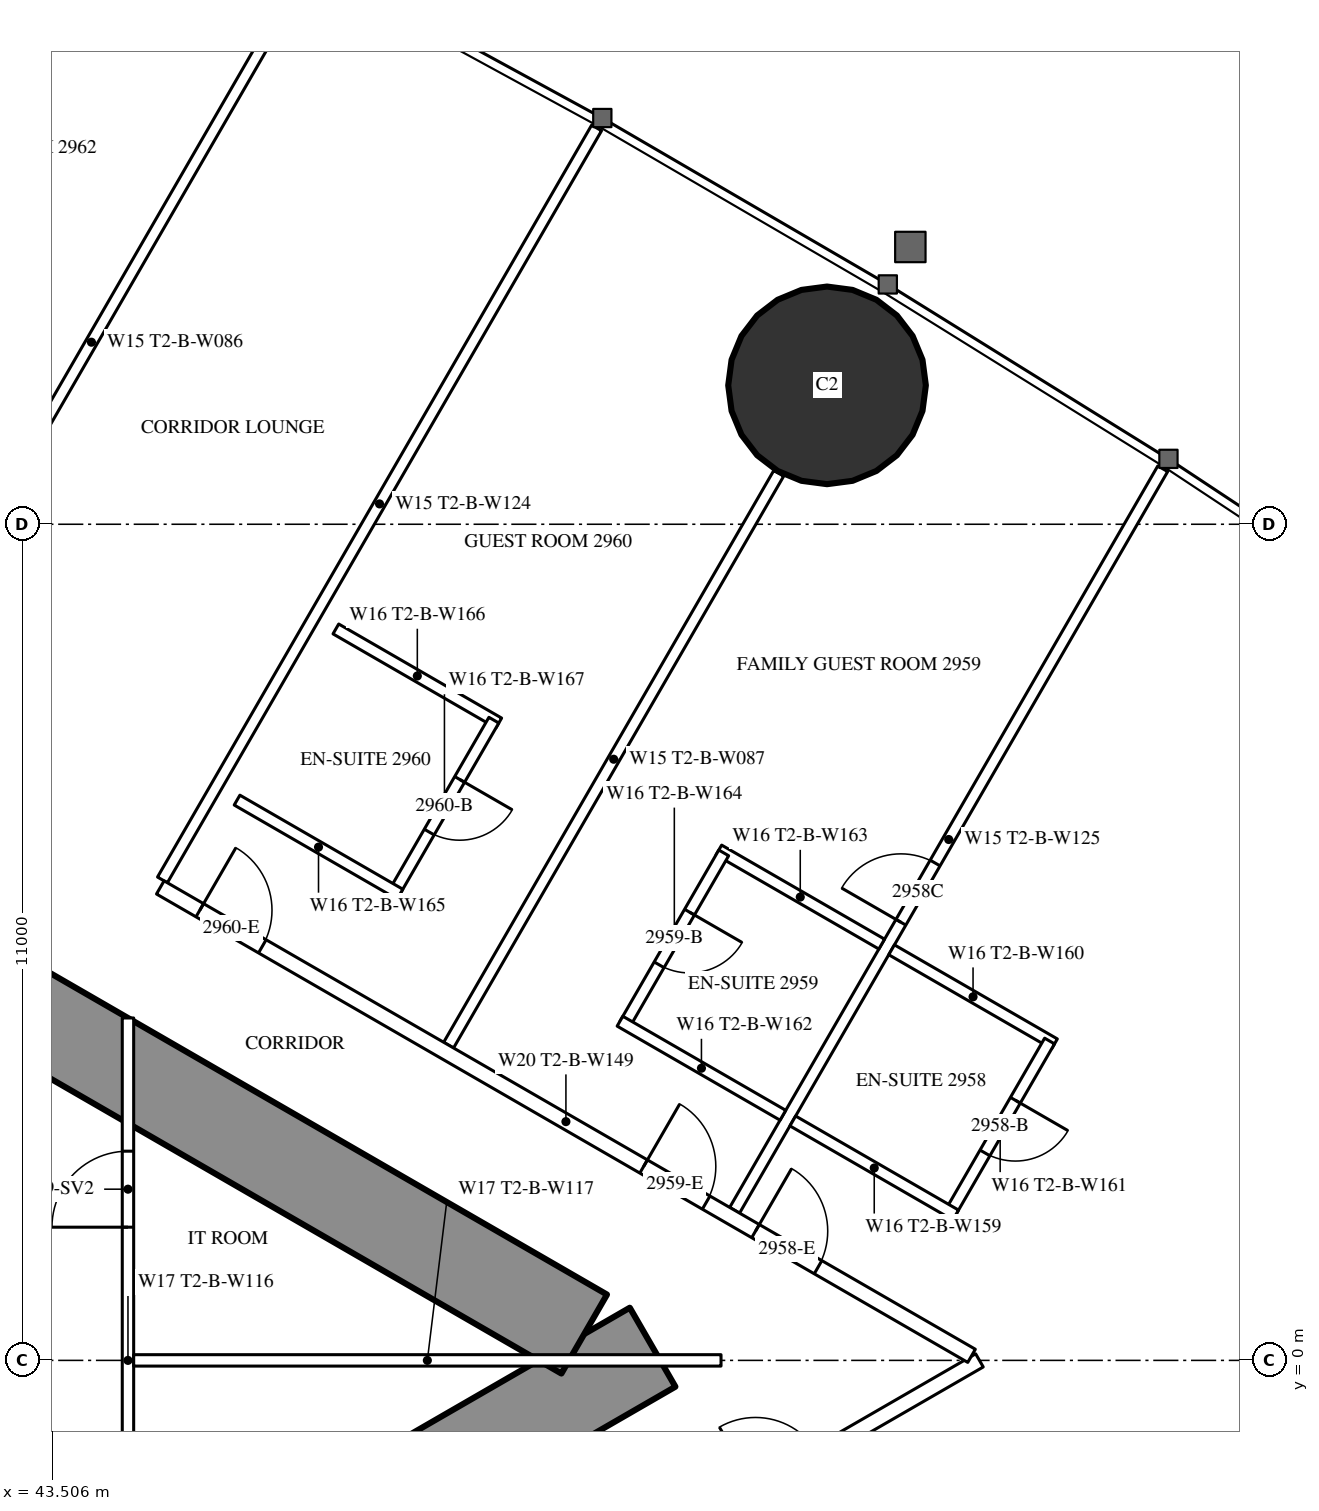
"""IFC4 building model, lengths in metres.
Left out: names, types, materials, properties, quantities, classifications, styles, units other than length and angle.
Written with IfcOpenShell. Run it as: python <this file> out.ifc"""

import sys

from ifc_helpers import new_model, si_unit, direction, frame, frame_2d, origin, origin_2d, place, context, subcontext, project, spatial, rectangle, hollow_circle, extrude, element, fill, save


model = new_model("IFC4")
c1 = context("Model", 3, precision=1e-05, world=origin(), true_north=direction((0.0, 1.0)))
c2 = subcontext(c1, "Body", "Model", "MODEL_VIEW")
j1 = project(units=[si_unit("LENGTHUNIT", "METRE"), si_unit("PLANEANGLEUNIT", "RADIAN")], contexts=[c1])
p1 = place(None, origin())
s1 = spatial("IfcSite", under=j1, at=p1, CompositionType="ELEMENT")
p2 = place(p1, origin())
s2 = spatial("IfcBuilding", under=s1, at=p2, CompositionType="ELEMENT")
p3 = place(p2, frame((0.0, 0.0, 111.6)))
s3 = spatial("IfcBuildingStorey", under=s2, at=p3, CompositionType="ELEMENT", Elevation=111.6)
p4 = place(p3, frame((53.697, 12.827, 0.0), z_axis=(0.0, 0.0, 1.0), x_axis=(1.0, 0.0, 0.0)))
e1 = element("IfcColumn", 1, at=p4, inside=s3, PredefinedType="COLUMN", context=c2, shape_type="SweptSolid", body=[
    extrude(hollow_circle(Radius=1.3, WallThickness=0.1, at=origin_2d()), origin(), (0.0, 0.0, 1.0), 3.5),
])
p5 = place(p3, frame((27.2, -13.8, 0.0), z_axis=(0.0, 0.0, 1.0), x_axis=(0.866027159892, 0.499996958321, 0.0)))
e2 = element("IfcWall", 2, at=p5, inside=s3, PredefinedType="SHEAR", context=c2, shape_type="SweptSolid", body=[
    extrude(rectangle(XDim=27.947, YDim=1.2, at=frame_2d((13.973, 0.0))), origin(), (0.0, 0.0, 1.0), 3.5),
])
p6 = place(p5, frame((4.6, 0.0, 0.0)))
e3 = element("IfcOpeningElement", 3, at=p6, cuts=e2, PredefinedType="OPENING", context=c2, shape_type="SweptSolid", body=[
    extrude(rectangle(XDim=1.0, YDim=2.2, at=frame_2d((0.5, 1.1))), frame((0.0, 0.61, 0.0), z_axis=(0.0, -1.0, 0.0), x_axis=(1.0, 0.0, 0.0)), (0.0, 0.0, 1.0), 1.22),
])
p7 = place(p5, frame((13.395, 0.0, 0.0)))
e4 = element("IfcOpeningElement", 4, at=p7, cuts=e2, PredefinedType="OPENING", context=c2, shape_type="SweptSolid", body=[
    extrude(rectangle(XDim=1.8, YDim=2.2, at=frame_2d((0.9, 1.1))), frame((0.0, 0.61, 0.0), z_axis=(0.0, -1.0, 0.0), x_axis=(1.0, 0.0, 0.0)), (0.0, 0.0, 1.0), 1.22),
])
p8 = place(p3, frame((27.2, 13.8, 0.0), z_axis=(0.0, 0.0, 1.0), x_axis=(0.866024515034, -0.500001539357, 0.0)))
e5 = element("IfcWall", 5, at=p8, inside=s3, PredefinedType="SHEAR", context=c2, shape_type="SweptSolid", body=[
    extrude(rectangle(XDim=26.907, YDim=1.2, at=frame_2d((13.454, 0.0))), origin(), (0.0, 0.0, 1.0), 3.5),
])
p9 = place(p8, frame((4.6, 0.0, 0.0)))
e6 = element("IfcOpeningElement", 6, at=p9, cuts=e5, PredefinedType="OPENING", context=c2, shape_type="SweptSolid", body=[
    extrude(rectangle(XDim=1.0, YDim=2.2, at=frame_2d((0.5, 1.1))), frame((0.0, 0.61, 0.0), z_axis=(0.0, -1.0, 0.0), x_axis=(1.0, 0.0, 0.0)), (0.0, 0.0, 1.0), 1.22),
])
p10 = place(p8, frame((13.395, 0.0, 0.0)))
e7 = element("IfcOpeningElement", 7, at=p10, cuts=e5, PredefinedType="OPENING", context=c2, shape_type="SweptSolid", body=[
    extrude(rectangle(XDim=1.8, YDim=2.2, at=frame_2d((0.9, 1.1))), frame((0.0, 0.61, 0.0), z_axis=(0.0, -1.0, 0.0), x_axis=(1.0, 0.0, 0.0)), (0.0, 0.0, 1.0), 1.22),
])
p11 = place(p3, frame((41.19, 8.494, 0.0), z_axis=(0.0, 0.0, 1.0), x_axis=(0.49999258054, 0.866029687369, 0.0)))
e8 = element("IfcWall", 8, at=p11, inside=s3, PredefinedType="PARTITIONING", context=c2, shape_type="SweptSolid", body=[
    extrude(rectangle(XDim=11.318, YDim=0.15, at=frame_2d((5.659, 0.0))), origin(), (0.0, 0.0, 1.0), 3.25),
])
p12 = place(p3, frame((44.954, 6.321, 0.0), z_axis=(0.0, 0.0, 1.0), x_axis=(0.500009815811, 0.866019736549, 0.0)))
e9 = element("IfcWall", 9, at=p12, inside=s3, PredefinedType="PARTITIONING", context=c2, shape_type="SweptSolid", body=[
    extrude(rectangle(XDim=11.424, YDim=0.15, at=frame_2d((5.712, 0.0))), origin(), (0.0, 0.0, 1.0), 3.25),
])
p13 = place(p3, frame((48.719, 4.147, 0.0), z_axis=(0.0, 0.0, 1.0), x_axis=(0.499993328235, 0.866029255696, 0.0)))
e10 = element("IfcWall", 10, at=p13, inside=s3, PredefinedType="PARTITIONING", context=c2, shape_type="SweptSolid", body=[
    extrude(rectangle(XDim=8.686, YDim=0.15, at=frame_2d((4.343, 0.0))), origin(), (0.0, 0.0, 1.0), 2.2),
])
p14 = place(p3, frame((52.481, 1.975, 0.0), z_axis=(0.0, 0.0, 1.0), x_axis=(0.500003867771, 0.866023170714, 0.0)))
e11 = element("IfcWall", 11, at=p14, inside=s3, PredefinedType="PARTITIONING", context=c2, shape_type="SweptSolid", body=[
    extrude(rectangle(XDim=11.265, YDim=0.15, at=frame_2d((5.632, 0.0))), origin(), (0.0, 0.0, 1.0), 3.25),
])
p15 = place(p14, frame((4.375, 0.0, 0.0)))
e12 = element("IfcOpeningElement", 12, at=p15, cuts=e11, PredefinedType="OPENING", context=c2, shape_type="SweptSolid", body=[
    extrude(rectangle(XDim=0.9, YDim=2.2, at=frame_2d((0.45, 1.1))), frame((0.0, 0.085, 0.0), z_axis=(0.0, -1.0, 0.0), x_axis=(1.0, 0.0, 0.0)), (0.0, 0.0, 1.0), 0.17),
])
p16 = place(p3, frame((37.96, -10.243, 0.0), z_axis=(0.0, 0.0, 1.0), x_axis=(0.866026429433, 0.499998223521, 0.0)))
e13 = element("IfcWall", 13, at=p16, inside=s3, PredefinedType="PARTITIONING", context=c2, shape_type="SweptSolid", body=[
    extrude(rectangle(XDim=20.487, YDim=0.2, at=frame_2d((10.243, 0.0))), origin(), (0.0, 0.0, 1.0), 3.25),
])
p17 = place(p16, frame((4.343, 0.0, 0.0)))
e14 = element("IfcOpeningElement", 14, at=p17, cuts=e13, PredefinedType="OPENING", context=c2, shape_type="SweptSolid", body=[
    extrude(rectangle(XDim=0.95, YDim=2.2, at=frame_2d((0.475, 1.1))), frame((0.0, 0.11, 0.0), z_axis=(0.0, -1.0, 0.0), x_axis=(1.0, 0.0, 0.0)), (0.0, 0.0, 1.0), 0.22),
])
p18 = place(p16, frame((15.385, 0.0, 0.0)))
e15 = element("IfcOpeningElement", 15, at=p18, cuts=e13, PredefinedType="OPENING", context=c2, shape_type="SweptSolid", body=[
    extrude(rectangle(XDim=0.95, YDim=2.2, at=frame_2d((0.475, 1.1))), frame((0.0, 0.11, 0.0), z_axis=(0.0, -1.0, 0.0), x_axis=(1.0, 0.0, 0.0)), (0.0, 0.0, 1.0), 0.22),
])
p19 = place(p16, frame((17.085, 0.0, 0.0)))
e16 = element("IfcOpeningElement", 16, at=p19, cuts=e13, PredefinedType="OPENING", context=c2, shape_type="SweptSolid", body=[
    extrude(rectangle(XDim=0.95, YDim=2.2, at=frame_2d((0.475, 1.1))), frame((0.0, 0.11, 0.0), z_axis=(0.0, -1.0, 0.0), x_axis=(1.0, 0.0, 0.0)), (0.0, 0.0, 1.0), 0.22),
])
p20 = place(p16, frame((1.048, 0.0, 0.0)))
e17 = element("IfcOpeningElement", 17, at=p20, cuts=e13, PredefinedType="OPENING", context=c2, shape_type="SweptSolid", body=[
    extrude(rectangle(XDim=1.8, YDim=2.2, at=frame_2d((0.9, 1.1))), frame((0.0, 0.11, 0.0), z_axis=(0.0, -1.0, 0.0), x_axis=(1.0, 0.0, 0.0)), (0.0, 0.0, 1.0), 0.22),
])
p21 = place(p3, frame((44.925, 6.222, 0.0), z_axis=(0.0, 0.0, 1.0), x_axis=(0.866025590081, -0.499999677325, 0.0)))
e18 = element("IfcWall", 18, at=p21, inside=s3, PredefinedType="PARTITIONING", context=c2, shape_type="SweptSolid", body=[
    extrude(rectangle(XDim=12.324, YDim=0.2, at=frame_2d((6.162, 0.0))), origin(), (0.0, 0.0, 1.0), 3.25),
])
p22 = place(p21, frame((9.042, 0.0, 0.0)))
e19 = element("IfcOpeningElement", 19, at=p22, cuts=e18, PredefinedType="OPENING", context=c2, shape_type="SweptSolid", body=[
    extrude(rectangle(XDim=0.95, YDim=2.2, at=frame_2d((0.475, 1.1))), frame((0.0, 0.11, 0.0), z_axis=(0.0, -1.0, 0.0), x_axis=(1.0, 0.0, 0.0)), (0.0, 0.0, 1.0), 0.22),
])
p23 = place(p21, frame((7.342, 0.0, 0.0)))
e20 = element("IfcOpeningElement", 20, at=p23, cuts=e18, PredefinedType="OPENING", context=c2, shape_type="SweptSolid", body=[
    extrude(rectangle(XDim=0.95, YDim=2.2, at=frame_2d((0.475, 1.1))), frame((0.0, 0.11, 0.0), z_axis=(0.0, -1.0, 0.0), x_axis=(1.0, 0.0, 0.0)), (0.0, 0.0, 1.0), 0.22),
])
p24 = place(p21, frame((0.6, 0.0, 0.0)))
e21 = element("IfcOpeningElement", 21, at=p24, cuts=e18, PredefinedType="OPENING", context=c2, shape_type="SweptSolid", body=[
    extrude(rectangle(XDim=0.95, YDim=2.2, at=frame_2d((0.475, 1.1))), frame((0.0, 0.11, 0.0), z_axis=(0.0, -1.0, 0.0), x_axis=(1.0, 0.0, 0.0)), (0.0, 0.0, 1.0), 0.22),
])
p25 = place(p3, frame((54.546, 5.402, 0.0), z_axis=(0.0, 0.0, 1.0), x_axis=(0.866006523861, -0.500032699561, 0.0)))
e22 = element("IfcWall", 22, at=p25, inside=s3, PredefinedType="PARTITIONING", context=c2, shape_type="SweptSolid", body=[
    extrude(rectangle(XDim=2.475, YDim=0.15, at=frame_2d((1.237, 0.0))), origin(), (0.0, 0.0, 1.0), 3.25),
])
p26 = place(p3, frame((55.325, 1.95, 0.0), z_axis=(0.0, 0.0, 1.0), x_axis=(0.500006934395, 0.866021400173, 0.0)))
e23 = element("IfcWall", 23, at=p26, inside=s3, PredefinedType="PARTITIONING", context=c2, shape_type="SweptSolid", body=[
    extrude(rectangle(XDim=2.6, YDim=0.15, at=frame_2d((1.3, 0.0))), origin(), (0.0, 0.0, 1.0), 3.25),
])
p27 = place(p26, frame((0.9, 0.0, 0.0)))
e24 = element("IfcOpeningElement", 24, at=p27, cuts=e23, PredefinedType="OPENING", context=c2, shape_type="SweptSolid", body=[
    extrude(rectangle(XDim=0.8, YDim=2.2, at=frame_2d((0.4, 1.1))), frame((0.0, 0.085, 0.0), z_axis=(0.0, -1.0, 0.0), x_axis=(1.0, 0.0, 0.0)), (0.0, 0.0, 1.0), 0.17),
])
p28 = place(p3, frame((53.246, 3.15, 0.0), z_axis=(0.0, 0.0, 1.0), x_axis=(0.866006523861, -0.500032699561, 0.0)))
e25 = element("IfcWall", 25, at=p28, inside=s3, PredefinedType="PARTITIONING", context=c2, shape_type="SweptSolid", body=[
    extrude(rectangle(XDim=2.475, YDim=0.15, at=frame_2d((1.237, 0.0))), origin(), (0.0, 0.0, 1.0), 3.25),
])
p29 = place(p3, frame((52.273, 6.714, 0.0), z_axis=(0.0, 0.0, 1.0), x_axis=(0.866031185235, -0.4999899861, 0.0)))
e26 = element("IfcWall", 26, at=p29, inside=s3, PredefinedType="PARTITIONING", context=c2, shape_type="SweptSolid", body=[
    extrude(rectangle(XDim=2.475, YDim=0.15, at=frame_2d((1.238, 0.0))), origin(), (0.0, 0.0, 1.0), 3.25),
])
p30 = place(p3, frame((51.038, 4.425, 0.0), z_axis=(0.0, 0.0, 1.0), x_axis=(0.49997716683, 0.86603858612, 0.0)))
e27 = element("IfcWall", 27, at=p30, inside=s3, PredefinedType="PARTITIONING", context=c2, shape_type="SweptSolid", body=[
    extrude(rectangle(XDim=2.6, YDim=0.15, at=frame_2d((1.3, 0.0))), origin(), (0.0, 0.0, 1.0), 3.25),
])
p31 = place(p30, frame((0.9, 0.0, 0.0)))
e28 = element("IfcOpeningElement", 28, at=p31, cuts=e27, PredefinedType="OPENING", context=c2, shape_type="SweptSolid", body=[
    extrude(rectangle(XDim=0.8, YDim=2.2, at=frame_2d((0.4, 1.1))), frame((0.0, 0.085, 0.0), z_axis=(0.0, -1.0, 0.0), x_axis=(1.0, 0.0, 0.0)), (0.0, 0.0, 1.0), 0.17),
])
p32 = place(p3, frame((50.973, 4.462, 0.0), z_axis=(0.0, 0.0, 1.0), x_axis=(0.866031185235, -0.4999899861, 0.0)))
e29 = element("IfcWall", 29, at=p32, inside=s3, PredefinedType="PARTITIONING", context=c2, shape_type="SweptSolid", body=[
    extrude(rectangle(XDim=2.475, YDim=0.15, at=frame_2d((1.238, 0.0))), origin(), (0.0, 0.0, 1.0), 3.25),
])
p33 = place(p3, frame((47.235, 9.623, 0.0), z_axis=(0.0, 0.0, 1.0), x_axis=(0.866006523861, -0.500032699561, 0.0)))
e30 = element("IfcWall", 30, at=p33, inside=s3, PredefinedType="PARTITIONING", context=c2, shape_type="SweptSolid", body=[
    extrude(rectangle(XDim=2.475, YDim=0.15, at=frame_2d((1.237, 0.0))), origin(), (0.0, 0.0, 1.0), 3.25),
])
p34 = place(p3, frame((48.013, 6.171, 0.0), z_axis=(0.0, 0.0, 1.0), x_axis=(0.500006934395, 0.866021400173, 0.0)))
e31 = element("IfcWall", 31, at=p34, inside=s3, PredefinedType="PARTITIONING", context=c2, shape_type="SweptSolid", body=[
    extrude(rectangle(XDim=2.6, YDim=0.15, at=frame_2d((1.3, 0.0))), origin(), (0.0, 0.0, 1.0), 3.25),
])
p35 = place(p34, frame((0.9, 0.0, 0.0)))
e32 = element("IfcOpeningElement", 32, at=p35, cuts=e31, PredefinedType="OPENING", context=c2, shape_type="SweptSolid", body=[
    extrude(rectangle(XDim=0.8, YDim=2.2, at=frame_2d((0.4, 1.1))), frame((0.0, 0.085, 0.0), z_axis=(0.0, -1.0, 0.0), x_axis=(1.0, 0.0, 0.0)), (0.0, 0.0, 1.0), 0.17),
])
p36 = place(p3, frame((45.935, 7.371, 0.0), z_axis=(0.0, 0.0, 1.0), x_axis=(0.866031185235, -0.4999899861, 0.0)))
e33 = element("IfcWall", 33, at=p36, inside=s3, PredefinedType="PARTITIONING", context=c2, shape_type="SweptSolid", body=[
    extrude(rectangle(XDim=2.475, YDim=0.15, at=frame_2d((1.238, 0.0))), origin(), (0.0, 0.0, 1.0), 3.25),
])
p37 = place(p3, frame((44.5, -4.505, 0.0), z_axis=(0.0, 0.0, 1.0), x_axis=(0.0, 1.0, 0.0)))
e34 = element("IfcWall", 34, at=p37, inside=s3, PredefinedType="PARTITIONING", context=c2, shape_type="SweptSolid", body=[
    extrude(rectangle(XDim=9.009, YDim=0.15, at=frame_2d((4.505, 0.0))), origin(), (0.0, 0.0, 1.0), 2.45),
])
p38 = place(p37, frame((1.752, 0.0, 0.0)))
e35 = element("IfcOpeningElement", 35, at=p38, cuts=e34, PredefinedType="OPENING", context=c2, shape_type="SweptSolid", body=[
    extrude(rectangle(XDim=1.0, YDim=2.2, at=frame_2d((0.5, 1.1))), frame((0.0, 0.085, 0.0), z_axis=(0.0, -1.0, 0.0), x_axis=(1.0, 0.0, 0.0)), (0.0, 0.0, 1.0), 0.17),
])
p39 = place(p37, frame((6.257, 0.0, 0.0)))
e36 = element("IfcOpeningElement", 36, at=p39, cuts=e34, PredefinedType="OPENING", context=c2, shape_type="SweptSolid", body=[
    extrude(rectangle(XDim=1.0, YDim=2.2, at=frame_2d((0.5, 1.1))), frame((0.0, 0.085, 0.0), z_axis=(0.0, -1.0, 0.0), x_axis=(1.0, 0.0, 0.0)), (0.0, 0.0, 1.0), 0.17),
])
p40 = place(p3, frame((44.575, 0.0, 0.0), z_axis=(0.0, 0.0, 1.0), x_axis=(1.0, 0.0, 0.0)))
e37 = element("IfcWall", 37, at=p40, inside=s3, PredefinedType="PARTITIONING", context=c2, shape_type="SweptSolid", body=[
    extrude(rectangle(XDim=7.727, YDim=0.15, at=frame_2d((3.864, 0.0))), origin(), (0.0, 0.0, 1.0), 2.2),
])
p41 = place(p27, origin())
e38 = element("IfcDoor", 38, at=p41, inside=s3, OperationType="SINGLE_SWING_RIGHT", PredefinedType="DOOR", context=c2, shape_type="SweptSolid", body=[
    extrude(rectangle(XDim=0.8, YDim=2.2, at=frame_2d((0.4, 1.1))), frame((0.0, 0.025, 0.0), z_axis=(0.0, -1.0, 0.0), x_axis=(1.0, 0.0, 0.0)), (0.0, 0.0, 1.0), 0.05),
])
fill(e24, e38)
p42 = place(p22, origin())
e39 = element("IfcDoor", 39, at=p42, inside=s3, OperationType="SINGLE_SWING_LEFT", PredefinedType="DOOR", context=c2, shape_type="SweptSolid", body=[
    extrude(rectangle(XDim=0.95, YDim=2.2, at=frame_2d((0.475, 1.1))), frame((0.0, 0.025, 0.0), z_axis=(0.0, -1.0, 0.0), x_axis=(1.0, 0.0, 0.0)), (0.0, 0.0, 1.0), 0.05),
])
fill(e19, e39)
p43 = place(p31, origin())
e40 = element("IfcDoor", 40, at=p43, inside=s3, OperationType="SINGLE_SWING_RIGHT", PredefinedType="DOOR", context=c2, shape_type="SweptSolid", body=[
    extrude(rectangle(XDim=0.8, YDim=2.2, at=frame_2d((0.4, 1.1))), frame((0.0, 0.025, 0.0), z_axis=(0.0, -1.0, 0.0), x_axis=(1.0, 0.0, 0.0)), (0.0, 0.0, 1.0), 0.05),
])
fill(e28, e40)
p44 = place(p23, origin())
e41 = element("IfcDoor", 41, at=p44, inside=s3, OperationType="SINGLE_SWING_LEFT", PredefinedType="DOOR", context=c2, shape_type="SweptSolid", body=[
    extrude(rectangle(XDim=0.95, YDim=2.2, at=frame_2d((0.475, 1.1))), frame((0.0, 0.025, 0.0), z_axis=(0.0, -1.0, 0.0), x_axis=(1.0, 0.0, 0.0)), (0.0, 0.0, 1.0), 0.05),
])
fill(e20, e41)
p45 = place(p35, origin())
e42 = element("IfcDoor", 42, at=p45, inside=s3, OperationType="SINGLE_SWING_RIGHT", PredefinedType="DOOR", context=c2, shape_type="SweptSolid", body=[
    extrude(rectangle(XDim=0.8, YDim=2.2, at=frame_2d((0.4, 1.1))), frame((0.0, 0.025, 0.0), z_axis=(0.0, -1.0, 0.0), x_axis=(1.0, 0.0, 0.0)), (0.0, 0.0, 1.0), 0.05),
])
fill(e32, e42)
p46 = place(p24, origin())
e43 = element("IfcDoor", 43, at=p46, inside=s3, OperationType="SINGLE_SWING_LEFT", PredefinedType="DOOR", context=c2, shape_type="SweptSolid", body=[
    extrude(rectangle(XDim=0.95, YDim=2.2, at=frame_2d((0.475, 1.1))), frame((0.0, 0.025, 0.0), z_axis=(0.0, -1.0, 0.0), x_axis=(1.0, 0.0, 0.0)), (0.0, 0.0, 1.0), 0.05),
])
fill(e21, e43)
p47 = place(p15, origin())
e44 = element("IfcDoor", 44, at=p47, inside=s3, OperationType="SINGLE_SWING_LEFT", PredefinedType="DOOR", context=c2, shape_type="SweptSolid", body=[
    extrude(rectangle(XDim=0.9, YDim=2.2, at=frame_2d((0.45, 1.1))), frame((0.0, 0.025, 0.0), z_axis=(0.0, -1.0, 0.0), x_axis=(1.0, 0.0, 0.0)), (0.0, 0.0, 1.0), 0.05),
])
fill(e12, e44)
p48 = place(p39, origin())
e45 = element("IfcDoor", 45, at=p48, inside=s3, OperationType="SINGLE_SWING_LEFT", PredefinedType="DOOR", context=c2, shape_type="SweptSolid", body=[
    extrude(rectangle(XDim=1.0, YDim=2.2, at=frame_2d((0.5, 1.1))), frame((0.0, 0.025, 0.0), z_axis=(0.0, -1.0, 0.0), x_axis=(1.0, 0.0, 0.0)), (0.0, 0.0, 1.0), 0.05),
])
fill(e36, e45)
save(model, sys.argv[1])
